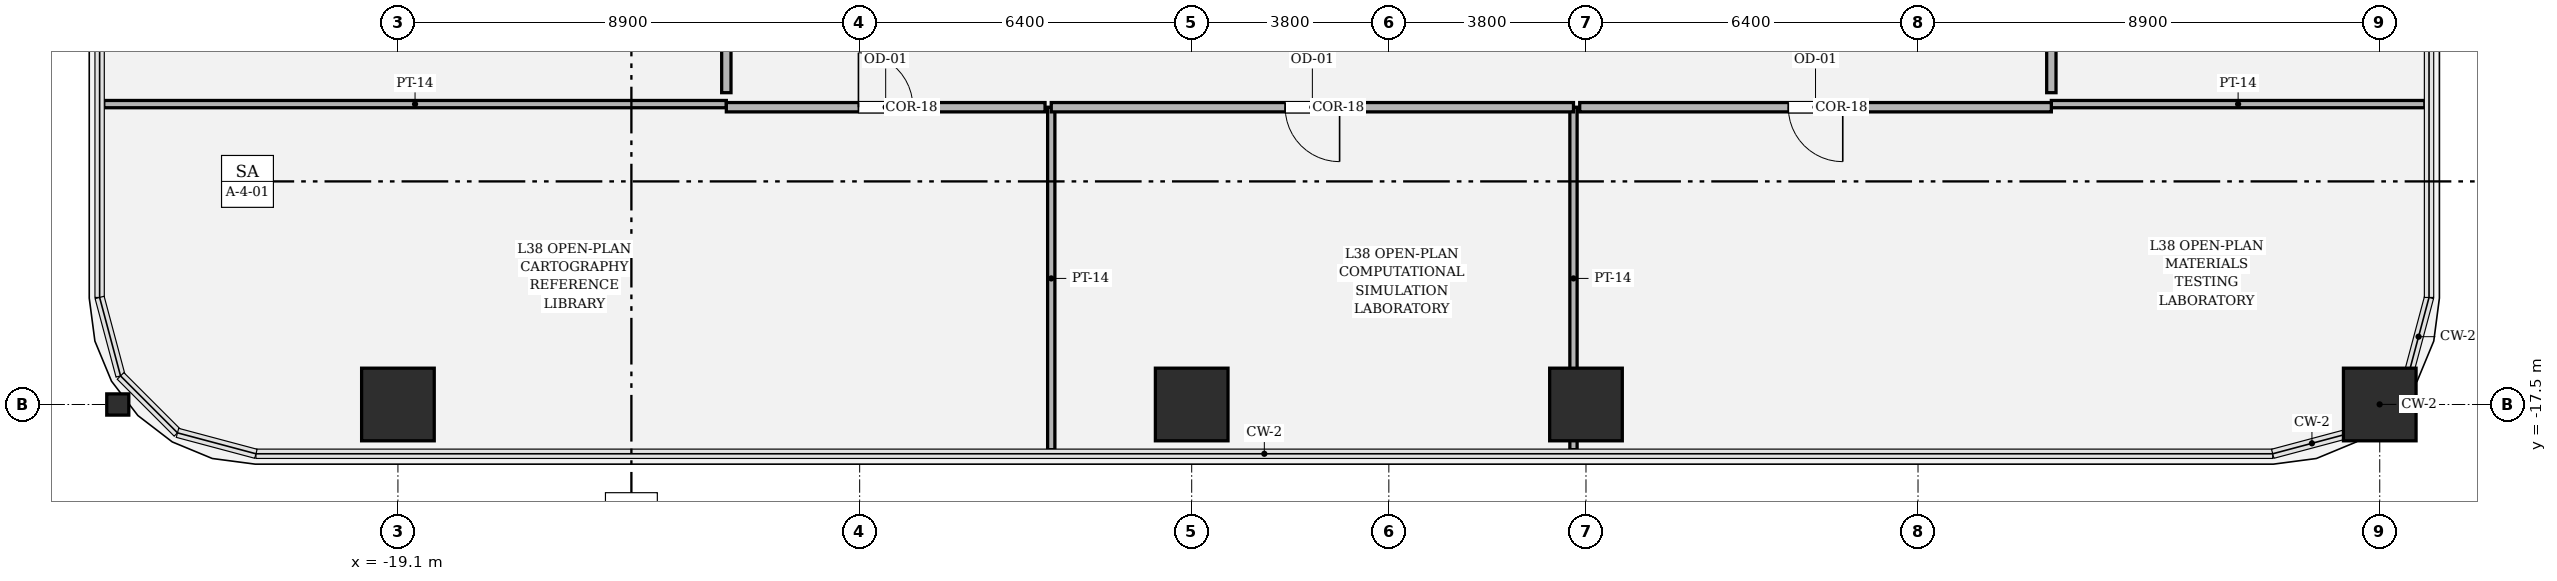
"""IFC4 building model, lengths in metres.
Left out: names, types, materials, properties, quantities, classifications, styles, units other than length and angle.
Written with IfcOpenShell. Run it as: python <this file> out.ifc"""

import sys

from ifc_helpers import new_model, si_unit, direction, frame, frame_2d, origin, origin_2d, place, context, subcontext, project, spatial, rectangle, hollow_rectangle, i_section, extrude, element, fill, save


model = new_model("IFC4")
c1 = context("Model", 3, precision=1e-05, world=origin(), true_north=direction((0.0, 1.0)))
c2 = subcontext(c1, "Body", "Model", "MODEL_VIEW")
j1 = project(units=[si_unit("LENGTHUNIT", "METRE"), si_unit("PLANEANGLEUNIT", "RADIAN")], contexts=[c1])
p1 = place(None, origin())
s1 = spatial("IfcSite", under=j1, at=p1, CompositionType="ELEMENT")
p2 = place(p1, origin())
s2 = spatial("IfcBuilding", under=s1, at=p2, CompositionType="ELEMENT")
p3 = place(p2, frame((0.0, 0.0, 164.1)))
s3 = spatial("IfcBuildingStorey", under=s2, at=p3, CompositionType="ELEMENT", Elevation=164.1)
for number, where, z_axis, x_axis in (
    (1, (-19.1, -17.5, 0.0), (0.0, 0.0, 1.0), (1.0, 0.0, 0.0)),
    (2, (-3.8, -17.5, 0.0), (0.0, 0.0, 1.0), (1.0, 0.0, 0.0)),
    (3, (3.8, -17.5, 0.0), (0.0, 0.0, 1.0), (1.0, 0.0, 0.0)),
    (4, (19.1, -17.5, 0.0), (0.0, 0.0, 1.0), (1.0, 0.0, 0.0)),
):
    element("IfcColumn", number, at=place(p3, frame(where, z_axis=z_axis, x_axis=x_axis)), inside=s3, PredefinedType="COLUMN", context=c2, shape_type="SweptSolid", body=[
        extrude(hollow_rectangle(XDim=1.4, YDim=1.4, WallThickness=0.042, at=origin_2d()), origin(), (0.0, 0.0, 1.0), 4.05),
    ])
p4 = place(p3, frame((-24.5, -17.5, 0.0), z_axis=(0.0, 0.0, 1.0), x_axis=(0.0, 1.0, 0.0)))
e5 = element("IfcColumn", 5, at=p4, inside=s3, PredefinedType="COLUMN", context=c2, shape_type="SweptSolid", body=[
    extrude(i_section(OverallWidth=0.409, OverallDepth=0.425, WebThickness=0.032, FlangeThickness=0.052, FilletRadius=0.018, at=origin_2d()), origin(), (0.0, 0.0, 1.0), 4.048),
])
for number, where, z_axis, x_axis in (
    (6, (3.559, -11.77, 0.0), (0.0, 0.0, 1.0), (0.0, -1.0, 0.0)),
    (7, (-6.507, -18.37, 0.0), (0.0, 0.0, 1.0), (0.0, 1.0, 0.0)),
):
    element("IfcWall", number, at=place(p3, frame(where, z_axis=z_axis, x_axis=x_axis)), inside=s3, PredefinedType="PARTITIONING", context=c2, shape_type="SweptSolid", body=[
        extrude(rectangle(XDim=6.6, YDim=0.14, at=frame_2d((3.3, 0.0))), origin(), (0.0, 0.0, 1.0), 3.174),
    ])
p5 = place(p3, frame((-6.507, -11.77, 0.0), z_axis=(0.0, 0.0, 1.0), x_axis=(1.0, 0.0, 0.0)))
e8 = element("IfcWall", 8, at=p5, inside=s3, PredefinedType="PARTITIONING", context=c2, shape_type="SweptSolid", body=[
    extrude(rectangle(XDim=10.066, YDim=0.18, at=frame_2d((5.033, 0.0))), origin(), (0.0, 0.0, 1.0), 3.174),
])
p6 = place(p5, frame((4.508, 0.0, 0.0)))
e9 = element("IfcOpeningElement", 9, at=p6, cuts=e8, PredefinedType="OPENING", context=c2, shape_type="SweptSolid", body=[
    extrude(rectangle(XDim=1.05, YDim=2.2, at=frame_2d((0.525, 1.1))), frame((0.0, 0.1, 0.0), z_axis=(0.0, -1.0, 0.0), x_axis=(1.0, 0.0, 0.0)), (0.0, 0.0, 1.0), 0.2),
])
p7 = place(p3, frame((-24.77, -11.71, 0.0), z_axis=(0.0, 0.0, 1.0), x_axis=(1.0, 0.0, 0.0)))
e10 = element("IfcWall", 10, at=p7, inside=s3, PredefinedType="PARTITIONING", context=c2, shape_type="SweptSolid", body=[
    extrude(rectangle(XDim=12.0, YDim=0.14, at=frame_2d((6.0, 0.0))), origin(), (0.0, 0.0, 1.0), 2.544),
])
p8 = place(p3, frame((-12.77, -11.77, 0.0), z_axis=(0.0, 0.0, 1.0), x_axis=(1.0, 0.0, 0.0)))
e11 = element("IfcWall", 11, at=p8, inside=s3, PredefinedType="PARTITIONING", context=c2, shape_type="SweptSolid", body=[
    extrude(rectangle(XDim=6.143, YDim=0.18, at=frame_2d((3.072, 0.0))), origin(), (0.0, 0.0, 1.0), 3.174),
])
p9 = place(p8, frame((2.546, 0.0, 0.0)))
e12 = element("IfcOpeningElement", 12, at=p9, cuts=e11, PredefinedType="OPENING", context=c2, shape_type="SweptSolid", body=[
    extrude(rectangle(XDim=1.05, YDim=2.2, at=frame_2d((0.525, 1.1))), frame((0.0, 0.1, 0.0), z_axis=(0.0, -1.0, 0.0), x_axis=(1.0, 0.0, 0.0)), (0.0, 0.0, 1.0), 0.2),
])
p10 = place(p3, frame((12.77, -11.71, 0.0), z_axis=(0.0, 0.0, 1.0), x_axis=(1.0, 0.0, 0.0)))
e13 = element("IfcWall", 13, at=p10, inside=s3, PredefinedType="PARTITIONING", context=c2, shape_type="SweptSolid", body=[
    extrude(rectangle(XDim=7.2, YDim=0.14, at=frame_2d((3.6, 0.0))), origin(), (0.0, 0.0, 1.0), 3.174),
])
p11 = place(p3, frame((3.679, -11.77, 0.0), z_axis=(0.0, 0.0, 1.0), x_axis=(1.0, 0.0, 0.0)))
e14 = element("IfcWall", 14, at=p11, inside=s3, PredefinedType="PARTITIONING", context=c2, shape_type="SweptSolid", body=[
    extrude(rectangle(XDim=9.091, YDim=0.18, at=frame_2d((4.545, 0.0))), origin(), (0.0, 0.0, 1.0), 3.174),
])
p12 = place(p11, frame((4.021, 0.0, 0.0)))
e15 = element("IfcOpeningElement", 15, at=p12, cuts=e14, PredefinedType="OPENING", context=c2, shape_type="SweptSolid", body=[
    extrude(rectangle(XDim=1.05, YDim=2.2, at=frame_2d((0.525, 1.1))), frame((0.0, 0.1, 0.0), z_axis=(0.0, -1.0, 0.0), x_axis=(1.0, 0.0, 0.0)), (0.0, 0.0, 1.0), 0.2),
])
p13 = place(p3, frame((-12.77, -1.2, 0.0), z_axis=(0.0, 0.0, 1.0), x_axis=(0.0, -1.0, 0.0)))
e16 = element("IfcWall", 16, at=p13, inside=s3, PredefinedType="PARTITIONING", context=c2, shape_type="SweptSolid", body=[
    extrude(rectangle(XDim=10.29, YDim=0.18, at=frame_2d((5.145, 0.0))), origin(), (0.0, 0.0, 1.0), 3.174),
])
p14 = place(p3, frame((12.77, -11.49, 0.0), z_axis=(0.0, 0.0, 1.0), x_axis=(0.0, 1.0, 0.0)))
e17 = element("IfcWall", 17, at=p14, inside=s3, PredefinedType="PARTITIONING", context=c2, shape_type="SweptSolid", body=[
    extrude(rectangle(XDim=17.63, YDim=0.18, at=frame_2d((8.815, 0.0))), origin(), (0.0, 0.0, 1.0), 3.174),
])
p15 = place(p14, frame((8.115, 0.0, 0.0)))
e18 = element("IfcOpeningElement", 18, at=p15, cuts=e17, PredefinedType="OPENING", context=c2, shape_type="SweptSolid", body=[
    extrude(rectangle(XDim=1.4, YDim=2.25, at=frame_2d((0.7, 1.125))), frame((0.0, 0.1, 0.0), z_axis=(0.0, -1.0, 0.0), x_axis=(1.0, 0.0, 0.0)), (0.0, 0.0, 1.0), 0.2),
])
p16 = place(p6, origin())
e19 = element("IfcDoor", 19, at=p16, inside=s3, OperationType="SINGLE_SWING_RIGHT", PredefinedType="DOOR", context=c2, shape_type="SweptSolid", body=[
    extrude(rectangle(XDim=1.05, YDim=2.2, at=frame_2d((0.525, 1.1))), frame((0.0, 0.025, 0.0), z_axis=(0.0, -1.0, 0.0), x_axis=(1.0, 0.0, 0.0)), (0.0, 0.0, 1.0), 0.05),
])
fill(e9, e19)
p17 = place(p9, origin())
e20 = element("IfcDoor", 20, at=p17, inside=s3, OperationType="SINGLE_SWING_LEFT", PredefinedType="DOOR", context=c2, shape_type="SweptSolid", body=[
    extrude(rectangle(XDim=1.05, YDim=2.2, at=frame_2d((0.525, 1.1))), frame((0.0, 0.025, 0.0), z_axis=(0.0, -1.0, 0.0), x_axis=(1.0, 0.0, 0.0)), (0.0, 0.0, 1.0), 0.05),
])
fill(e12, e20)
p18 = place(p12, origin())
e21 = element("IfcDoor", 21, at=p18, inside=s3, OperationType="SINGLE_SWING_RIGHT", PredefinedType="DOOR", context=c2, shape_type="SweptSolid", body=[
    extrude(rectangle(XDim=1.05, YDim=2.2, at=frame_2d((0.525, 1.1))), frame((0.0, 0.025, 0.0), z_axis=(0.0, -1.0, 0.0), x_axis=(1.0, 0.0, 0.0)), (0.0, 0.0, 1.0), 0.05),
])
fill(e15, e21)
save(model, sys.argv[1])
